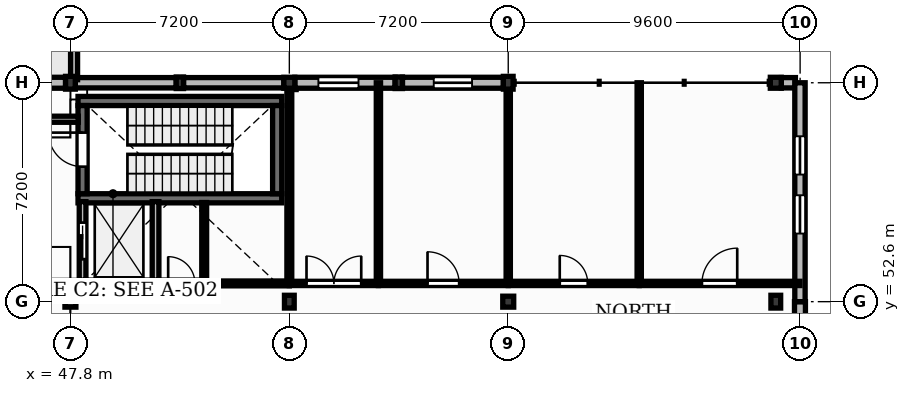
"""IFC4 building model, lengths in metres.
Left out: names, types, materials, properties, quantities, classifications, styles, units other than length and angle.
Written with IfcOpenShell. Run it as: python <this file> out.ifc"""

import sys

from ifc_helpers import new_model, si_unit, direction, frame, frame_2d, origin, origin_2d, place, context, subcontext, project, spatial, rectangle, extrude, element, fill, save


model = new_model("IFC4")
c1 = context("Model", 3, precision=1e-05, world=origin(), true_north=direction((0.0, 1.0)))
c2 = subcontext(c1, "Body", "Model", "MODEL_VIEW")
j1 = project(units=[si_unit("LENGTHUNIT", "METRE"), si_unit("PLANEANGLEUNIT", "RADIAN")], contexts=[c1])
p1 = place(None, origin())
s1 = spatial("IfcSite", under=j1, at=p1, CompositionType="ELEMENT")
p2 = place(p1, origin())
s2 = spatial("IfcBuilding", under=s1, at=p2, CompositionType="ELEMENT")
p3 = place(p2, frame((0.0, 0.0, 4.5)))
s3 = spatial("IfcBuildingStorey", under=s2, at=p3, CompositionType="ELEMENT", Elevation=4.5)
p4 = place(p3, frame((47.8, 52.6, 0.0), z_axis=(0.0, 0.0, 1.0), x_axis=(1.0, 0.0, 0.0)))
e1 = element("IfcColumn", 1, at=p4, inside=s3, PredefinedType="COLUMN", context=c2, shape_type="SweptSolid", body=[
    extrude(rectangle(XDim=0.36, YDim=0.36, at=origin_2d()), origin(), (0.0, 0.0, 1.0), 4.26),
])
for number, where, z_axis, x_axis in (
    (2, (47.8, 59.8, 0.0), (0.0, 0.0, 1.0), (1.0, 0.0, 0.0)),
    (3, (55.0, 52.6, 0.0), (0.0, 0.0, 1.0), (1.0, 0.0, 0.0)),
):
    element("IfcColumn", number, at=place(p3, frame(where, z_axis=z_axis, x_axis=x_axis)), inside=s3, PredefinedType="COLUMN", context=c2, shape_type="SweptSolid", body=[
        extrude(rectangle(XDim=0.32, YDim=0.42, at=origin_2d()), origin(), (0.0, 0.0, 1.0), 4.26),
    ])
for number, where, z_axis, x_axis in (
    (4, (55.0, 59.8, 0.0), (0.0, 0.0, 1.0), (1.0, 0.0, 0.0)),
    (5, (62.2, 52.6, 0.0), (0.0, 0.0, 1.0), (1.0, 0.0, 0.0)),
):
    element("IfcColumn", number, at=place(p3, frame(where, z_axis=z_axis, x_axis=x_axis)), inside=s3, PredefinedType="COLUMN", context=c2, shape_type="SweptSolid", body=[
        extrude(rectangle(XDim=0.36, YDim=0.36, at=origin_2d()), origin(), (0.0, 0.0, 1.0), 4.26),
    ])
for number, where, z_axis, x_axis in (
    (6, (62.2, 59.8, 0.0), (0.0, 0.0, 1.0), (1.0, 0.0, 0.0)),
    (7, (71.0, 52.6, 0.0), (0.0, 0.0, 1.0), (1.0, 0.0, 0.0)),
):
    element("IfcColumn", number, at=place(p3, frame(where, z_axis=z_axis, x_axis=x_axis)), inside=s3, PredefinedType="COLUMN", context=c2, shape_type="SweptSolid", body=[
        extrude(rectangle(XDim=0.32, YDim=0.42, at=origin_2d()), origin(), (0.0, 0.0, 1.0), 4.26),
    ])
p5 = place(p3, frame((71.0, 59.8, 0.0), z_axis=(0.0, 0.0, 1.0), x_axis=(1.0, 0.0, 0.0)))
e8 = element("IfcColumn", 8, at=p5, inside=s3, PredefinedType="COLUMN", context=c2, shape_type="SweptSolid", body=[
    extrude(rectangle(XDim=0.36, YDim=0.36, at=origin_2d()), origin(), (0.0, 0.0, 1.0), 4.26),
])
for number, where, z_axis, x_axis in (
    (9, (51.4, 59.8, 0.0), (0.0, 0.0, 1.0), (1.0, 0.0, 0.0)),
    (10, (58.6, 59.8, 0.0), (0.0, 0.0, 1.0), (1.0, 0.0, 0.0)),
):
    element("IfcColumn", number, at=place(p3, frame(where, z_axis=z_axis, x_axis=x_axis)), inside=s3, PredefinedType="PILASTER", context=c2, shape_type="SweptSolid", body=[
        extrude(rectangle(XDim=0.24, YDim=0.38, at=origin_2d()), origin(), (0.0, 0.0, 1.0), 4.26),
    ])
p6 = place(p3, frame((40.78, 59.8, 0.0), z_axis=(0.0, 0.0, 1.0), x_axis=(1.0, 0.0, 0.0)))
e11 = element("IfcWall", 11, at=p6, inside=s3, PredefinedType="SOLIDWALL", context=c2, shape_type="SweptSolid", body=[
    extrude(rectangle(XDim=6.86, YDim=0.36, at=frame_2d((3.43, 0.0))), origin(), (0.0, 0.0, 1.0), 3.8),
])
p7 = place(p6, frame((0.66, 0.0, 1.05)))
e12 = element("IfcOpeningElement", 12, at=p7, cuts=e11, PredefinedType="OPENING", context=c2, shape_type="SweptSolid", body=[
    extrude(rectangle(XDim=1.82, YDim=1.65, at=frame_2d((0.91, 0.825))), frame((0.0, 0.19, 0.0), z_axis=(0.0, -1.0, 0.0), x_axis=(1.0, 0.0, 0.0)), (0.0, 0.0, 1.0), 0.38),
])
p8 = place(p6, frame((4.33, 0.0, 1.0)))
e13 = element("IfcOpeningElement", 13, at=p8, cuts=e11, PredefinedType="OPENING", context=c2, shape_type="SweptSolid", body=[
    extrude(rectangle(XDim=1.1, YDim=1.8, at=frame_2d((0.55, 0.9))), frame((0.0, 0.19, 0.0), z_axis=(0.0, -1.0, 0.0), x_axis=(1.0, 0.0, 0.0)), (0.0, 0.0, 1.0), 0.38),
])
p9 = place(p3, frame((47.96, 59.8, 0.0), z_axis=(0.0, 0.0, 1.0), x_axis=(1.0, 0.0, 0.0)))
e14 = element("IfcWall", 14, at=p9, inside=s3, PredefinedType="SOLIDWALL", context=c2, shape_type="SweptSolid", body=[
    extrude(rectangle(XDim=3.32, YDim=0.34, at=frame_2d((1.66, 0.0))), origin(), (0.0, 0.0, 1.0), 3.8),
])
p10 = place(p3, frame((51.52, 59.8, 0.0), z_axis=(0.0, 0.0, 1.0), x_axis=(1.0, 0.0, 0.0)))
e15 = element("IfcWall", 15, at=p10, inside=s3, PredefinedType="SOLIDWALL", context=c2, shape_type="SweptSolid", body=[
    extrude(rectangle(XDim=3.3, YDim=0.34, at=frame_2d((1.65, 0.0))), origin(), (0.0, 0.0, 1.0), 3.8),
])
p11 = place(p3, frame((55.18, 59.8, 0.0), z_axis=(0.0, 0.0, 1.0), x_axis=(1.0, 0.0, 0.0)))
e16 = element("IfcWall", 16, at=p11, inside=s3, PredefinedType="SOLIDWALL", context=c2, shape_type="SweptSolid", body=[
    extrude(rectangle(XDim=3.3, YDim=0.36, at=frame_2d((1.65, 0.0))), origin(), (0.0, 0.0, 1.0), 3.8),
])
p12 = place(p11, frame((0.775, 0.0, 1.5)))
e17 = element("IfcOpeningElement", 17, at=p12, cuts=e16, PredefinedType="OPENING", context=c2, shape_type="SweptSolid", body=[
    extrude(rectangle(XDim=1.32, YDim=1.25, at=frame_2d((0.66, 0.625))), frame((0.0, 0.19, 0.0), z_axis=(0.0, -1.0, 0.0), x_axis=(1.0, 0.0, 0.0)), (0.0, 0.0, 1.0), 0.38),
])
p13 = place(p3, frame((58.72, 59.8, 0.0), z_axis=(0.0, 0.0, 1.0), x_axis=(1.0, 0.0, 0.0)))
e18 = element("IfcWall", 18, at=p13, inside=s3, PredefinedType="SOLIDWALL", context=c2, shape_type="SweptSolid", body=[
    extrude(rectangle(XDim=3.32, YDim=0.36, at=frame_2d((1.66, 0.0))), origin(), (0.0, 0.0, 1.0), 3.8),
])
p14 = place(p13, frame((1.03, 0.0, 1.05)))
e19 = element("IfcOpeningElement", 19, at=p14, cuts=e18, PredefinedType="OPENING", context=c2, shape_type="SweptSolid", body=[
    extrude(rectangle(XDim=1.26, YDim=1.65, at=frame_2d((0.63, 0.825))), frame((0.0, 0.19, 0.0), z_axis=(0.0, -1.0, 0.0), x_axis=(1.0, 0.0, 0.0)), (0.0, 0.0, 1.0), 0.38),
])
p15 = place(p3, frame((71.795, 45.4, 0.0), z_axis=(0.0, 0.0, 1.0), x_axis=(0.0, 1.0, 0.0)))
e20 = element("IfcWall", 20, at=p15, inside=s3, PredefinedType="SOLIDWALL", context=c2, shape_type="SweptSolid", body=[
    extrude(rectangle(XDim=7.2, YDim=0.36, at=frame_2d((3.6, 0.0))), origin(), (0.0, 0.0, 1.0), 4.26),
])
p16 = place(p15, frame((0.98, 0.0, 1.0)))
e21 = element("IfcOpeningElement", 21, at=p16, cuts=e20, PredefinedType="OPENING", context=c2, shape_type="SweptSolid", body=[
    extrude(rectangle(XDim=1.34, YDim=1.95, at=frame_2d((0.67, 0.975))), frame((0.0, 0.19, 0.0), z_axis=(0.0, -1.0, 0.0), x_axis=(1.0, 0.0, 0.0)), (0.0, 0.0, 1.0), 0.38),
])
p17 = place(p15, frame((3.0, 0.0, 1.0)))
e22 = element("IfcOpeningElement", 22, at=p17, cuts=e20, PredefinedType="OPENING", context=c2, shape_type="SweptSolid", body=[
    extrude(rectangle(XDim=1.34, YDim=1.95, at=frame_2d((0.67, 0.975))), frame((0.0, 0.19, 0.0), z_axis=(0.0, -1.0, 0.0), x_axis=(1.0, 0.0, 0.0)), (0.0, 0.0, 1.0), 0.38),
])
p18 = place(p3, frame((71.18, 59.8, 0.0), z_axis=(0.0, 0.0, 1.0), x_axis=(1.0, 0.0, 0.0)))
e23 = element("IfcWall", 23, at=p18, inside=s3, PredefinedType="SOLIDWALL", context=c2, shape_type="SweptSolid", body=[
    extrude(rectangle(XDim=0.465, YDim=0.34, at=frame_2d((0.232, 0.0))), origin(), (0.0, 0.0, 1.0), 4.26),
])
p19 = place(p3, frame((71.795, 52.6, 0.0), z_axis=(0.0, 0.0, 1.0), x_axis=(0.0, 1.0, 0.0)))
e24 = element("IfcWall", 24, at=p19, inside=s3, PredefinedType="SOLIDWALL", context=c2, shape_type="SweptSolid", body=[
    extrude(rectangle(XDim=7.2, YDim=0.34, at=frame_2d((3.6, 0.0))), origin(), (0.0, 0.0, 1.0), 4.26),
])
p20 = place(p19, frame((2.24, 0.0, 1.05)))
e25 = element("IfcOpeningElement", 25, at=p20, cuts=e24, PredefinedType="OPENING", context=c2, shape_type="SweptSolid", body=[
    extrude(rectangle(XDim=1.26, YDim=1.65, at=frame_2d((0.63, 0.825))), frame((0.0, 0.18, 0.0), z_axis=(0.0, -1.0, 0.0), x_axis=(1.0, 0.0, 0.0)), (0.0, 0.0, 1.0), 0.36),
])
p21 = place(p19, frame((4.18, 0.0, 1.05)))
e26 = element("IfcOpeningElement", 26, at=p21, cuts=e24, PredefinedType="OPENING", context=c2, shape_type="SweptSolid", body=[
    extrude(rectangle(XDim=1.26, YDim=1.65, at=frame_2d((0.63, 0.825))), frame((0.0, 0.18, 0.0), z_axis=(0.0, -1.0, 0.0), x_axis=(1.0, 0.0, 0.0)), (0.0, 0.0, 1.0), 0.36),
])
p22 = place(p3, frame((47.92, 59.9, -0.05), z_axis=(0.0, 0.0, 1.0), x_axis=(0.0, 1.0, 0.0)))
e27 = element("IfcWall", 27, at=p22, inside=s3, PredefinedType="PARAPET", context=c2, shape_type="SweptSolid", body=[
    extrude(rectangle(XDim=1.68, YDim=0.23, at=frame_2d((0.84, 0.0))), origin(), (0.0, 0.0, 1.0), 0.8),
])
for number, where, z_axis, x_axis in (
    (28, (48.05, 56.0, 0.0), (0.0, 0.0, 1.0), (1.0, 0.0, 0.0)),
    (29, (48.05, 59.2, 0.0), (0.0, 0.0, 1.0), (1.0, 0.0, 0.0)),
):
    element("IfcWall", number, at=place(p3, frame(where, z_axis=z_axis, x_axis=x_axis)), inside=s3, PredefinedType="SHEAR", context=c2, shape_type="SweptSolid", body=[
        extrude(rectangle(XDim=6.7, YDim=0.3, at=frame_2d((3.35, 0.0))), origin(), (0.0, 0.0, 1.0), 4.25),
    ])
p23 = place(p3, frame((48.2, 56.15, 0.0), z_axis=(0.0, 0.0, 1.0), x_axis=(0.0, 1.0, 0.0)))
e30 = element("IfcWall", 30, at=p23, inside=s3, PredefinedType="SHEAR", context=c2, shape_type="SweptSolid", body=[
    extrude(rectangle(XDim=2.9, YDim=0.3, at=frame_2d((1.45, 0.0))), origin(), (0.0, 0.0, 1.0), 4.25),
])
p24 = place(p23, frame((0.89, 0.0, 0.0)))
e31 = element("IfcOpeningElement", 31, at=p24, cuts=e30, PredefinedType="OPENING", context=c2, shape_type="SweptSolid", body=[
    extrude(rectangle(XDim=1.12, YDim=2.1, at=frame_2d((0.56, 1.05))), frame((0.0, 0.16, 0.0), z_axis=(0.0, -1.0, 0.0), x_axis=(1.0, 0.0, 0.0)), (0.0, 0.0, 1.0), 0.32),
])
p25 = place(p3, frame((54.6, 56.15, 0.0), z_axis=(0.0, 0.0, 1.0), x_axis=(0.0, 1.0, 0.0)))
e32 = element("IfcWall", 32, at=p25, inside=s3, PredefinedType="SHEAR", context=c2, shape_type="SweptSolid", body=[
    extrude(rectangle(XDim=2.9, YDim=0.3, at=frame_2d((1.45, 0.0))), origin(), (0.0, 0.0, 1.0), 4.25),
])
p26 = place(p3, frame((48.2, 53.2, 0.0), z_axis=(0.0, 0.0, 1.0), x_axis=(1.0, 0.0, 0.0)))
e33 = element("IfcWall", 33, at=p26, inside=s3, PredefinedType="SOLIDWALL", context=c2, shape_type="SweptSolid", body=[
    extrude(rectangle(XDim=2.4, YDim=0.22, at=frame_2d((1.2, 0.0))), origin(), (0.0, 0.0, 1.0), 4.25),
])
p27 = place(p3, frame((48.2, 53.31, 0.0), z_axis=(0.0, 0.0, 1.0), x_axis=(0.0, 1.0, 0.0)))
e34 = element("IfcWall", 34, at=p27, inside=s3, PredefinedType="SOLIDWALL", context=c2, shape_type="SweptSolid", body=[
    extrude(rectangle(XDim=2.58, YDim=0.22, at=frame_2d((1.29, 0.0))), origin(), (0.0, 0.0, 1.0), 4.25),
])
p28 = place(p27, frame((0.69, 0.0, 0.0)))
e35 = element("IfcOpeningElement", 35, at=p28, cuts=e34, PredefinedType="OPENING", context=c2, shape_type="SweptSolid", body=[
    extrude(rectangle(XDim=1.2, YDim=2.15, at=frame_2d((0.6, 1.075))), frame((0.0, 0.12, 0.0), z_axis=(0.0, -1.0, 0.0), x_axis=(1.0, 0.0, 0.0)), (0.0, 0.0, 1.0), 0.24),
])
p29 = place(p3, frame((50.6, 53.31, 0.0), z_axis=(0.0, 0.0, 1.0), x_axis=(0.0, 1.0, 0.0)))
e36 = element("IfcWall", 36, at=p29, inside=s3, PredefinedType="SOLIDWALL", context=c2, shape_type="SweptSolid", body=[
    extrude(rectangle(XDim=2.58, YDim=0.22, at=frame_2d((1.29, 0.0))), origin(), (0.0, 0.0, 1.0), 4.25),
])
p30 = place(p3, frame((43.8, 53.2, 0.0), z_axis=(0.0, 0.0, 1.0), x_axis=(1.0, 0.0, 0.0)))
e37 = element("IfcWall", 37, at=p30, inside=s3, PredefinedType="PARTITIONING", context=c2, shape_type="SweptSolid", body=[
    extrude(rectangle(XDim=4.29, YDim=0.2, at=frame_2d((2.145, 0.0))), origin(), (0.0, 0.0, 1.0), 4.18),
])
p31 = place(p30, frame((1.405, 0.0, 0.0)))
e38 = element("IfcOpeningElement", 38, at=p31, cuts=e37, PredefinedType="OPENING", context=c2, shape_type="SweptSolid", body=[
    extrude(rectangle(XDim=1.48, YDim=2.25, at=frame_2d((0.74, 1.125))), frame((0.0, 0.11, 0.0), z_axis=(0.0, -1.0, 0.0), x_axis=(1.0, 0.0, 0.0)), (0.0, 0.0, 1.0), 0.22),
])
p32 = place(p3, frame((50.71, 53.2, 0.0), z_axis=(0.0, 0.0, 1.0), x_axis=(1.0, 0.0, 0.0)))
e39 = element("IfcWall", 39, at=p32, inside=s3, PredefinedType="SOLIDWALL", context=c2, shape_type="SweptSolid", body=[
    extrude(rectangle(XDim=1.49, YDim=0.22, at=frame_2d((0.745, 0.0))), origin(), (0.0, 0.0, 1.0), 4.18),
])
p33 = place(p32, frame((0.305, 0.0, 0.0)))
e40 = element("IfcOpeningElement", 40, at=p33, cuts=e39, PredefinedType="OPENING", context=c2, shape_type="SweptSolid", body=[
    extrude(rectangle(XDim=0.88, YDim=2.05, at=frame_2d((0.44, 1.025))), frame((0.0, 0.12, 0.0), z_axis=(0.0, -1.0, 0.0), x_axis=(1.0, 0.0, 0.0)), (0.0, 0.0, 1.0), 0.24),
])
p34 = place(p3, frame((55.0, 53.2, 0.0), z_axis=(0.0, 0.0, 1.0), x_axis=(1.0, 0.0, 0.0)))
e41 = element("IfcWall", 41, at=p34, inside=s3, PredefinedType="PARTITIONING", context=c2, shape_type="SweptSolid", body=[
    extrude(rectangle(XDim=2.93, YDim=0.14, at=frame_2d((1.465, 0.0))), origin(), (0.0, 0.0, 1.0), 4.18),
])
p35 = place(p34, frame((0.565, 0.0, 0.0)))
e42 = element("IfcOpeningElement", 42, at=p35, cuts=e41, PredefinedType="OPENING", context=c2, shape_type="SweptSolid", body=[
    extrude(rectangle(XDim=1.8, YDim=2.3, at=frame_2d((0.9, 1.15))), frame((0.0, 0.08, 0.0), z_axis=(0.0, -1.0, 0.0), x_axis=(1.0, 0.0, 0.0)), (0.0, 0.0, 1.0), 0.16),
])
p36 = place(p3, frame((57.93, 53.27, 0.0), z_axis=(0.0, 0.0, 1.0), x_axis=(0.0, 1.0, 0.0)))
e43 = element("IfcWall", 43, at=p36, inside=s3, PredefinedType="PARTITIONING", context=c2, shape_type="SweptSolid", body=[
    extrude(rectangle(XDim=6.53, YDim=0.14, at=frame_2d((3.265, 0.0))), origin(), (0.0, 0.0, 1.0), 4.18),
])
p37 = place(p3, frame((57.93, 53.2, 0.0), z_axis=(0.0, 0.0, 1.0), x_axis=(1.0, 0.0, 0.0)))
e44 = element("IfcWall", 44, at=p37, inside=s3, PredefinedType="PARTITIONING", context=c2, shape_type="SweptSolid", body=[
    extrude(rectangle(XDim=4.27, YDim=0.14, at=frame_2d((2.135, 0.0))), origin(), (0.0, 0.0, 1.0), 4.18),
])
p38 = place(p37, frame((1.615, 0.0, 0.0)))
e45 = element("IfcOpeningElement", 45, at=p38, cuts=e44, PredefinedType="OPENING", context=c2, shape_type="SweptSolid", body=[
    extrude(rectangle(XDim=1.04, YDim=2.1, at=frame_2d((0.52, 1.05))), frame((0.0, 0.08, 0.0), z_axis=(0.0, -1.0, 0.0), x_axis=(1.0, 0.0, 0.0)), (0.0, 0.0, 1.0), 0.16),
])
p39 = place(p3, frame((62.2, 53.27, 0.0), z_axis=(0.0, 0.0, 1.0), x_axis=(0.0, 1.0, 0.0)))
e46 = element("IfcWall", 46, at=p39, inside=s3, PredefinedType="PARTITIONING", context=c2, shape_type="SweptSolid", body=[
    extrude(rectangle(XDim=6.32, YDim=0.14, at=frame_2d((3.16, 0.0))), origin(), (0.0, 0.0, 1.0), 3.74),
])
p40 = place(p3, frame((62.2, 53.2, 0.0), z_axis=(0.0, 0.0, 1.0), x_axis=(1.0, 0.0, 0.0)))
e47 = element("IfcWall", 47, at=p40, inside=s3, PredefinedType="PARTITIONING", context=c2, shape_type="SweptSolid", body=[
    extrude(rectangle(XDim=4.308, YDim=0.14, at=frame_2d((2.154, 0.0))), origin(), (0.0, 0.0, 1.0), 4.18),
])
p41 = place(p40, frame((1.694, 0.0, 0.0)))
e48 = element("IfcOpeningElement", 48, at=p41, cuts=e47, PredefinedType="OPENING", context=c2, shape_type="SweptSolid", body=[
    extrude(rectangle(XDim=0.92, YDim=2.1, at=frame_2d((0.46, 1.05))), frame((0.0, 0.08, 0.0), z_axis=(0.0, -1.0, 0.0), x_axis=(1.0, 0.0, 0.0)), (0.0, 0.0, 1.0), 0.16),
])
p42 = place(p3, frame((66.508, 53.27, 0.0), z_axis=(0.0, 0.0, 1.0), x_axis=(0.0, 1.0, 0.0)))
e49 = element("IfcWall", 49, at=p42, inside=s3, PredefinedType="PARTITIONING", context=c2, shape_type="SweptSolid", body=[
    extrude(rectangle(XDim=6.53, YDim=0.14, at=frame_2d((3.265, 0.0))), origin(), (0.0, 0.0, 1.0), 3.86),
])
p43 = place(p3, frame((66.508, 53.2, 0.0), z_axis=(0.0, 0.0, 1.0), x_axis=(1.0, 0.0, 0.0)))
e50 = element("IfcWall", 50, at=p43, inside=s3, PredefinedType="PARTITIONING", context=c2, shape_type="SweptSolid", body=[
    extrude(rectangle(XDim=5.287, YDim=0.14, at=frame_2d((2.644, 0.0))), origin(), (0.0, 0.0, 1.0), 4.18),
])
p44 = place(p43, frame((2.063, 0.0, 0.0)))
e51 = element("IfcOpeningElement", 51, at=p44, cuts=e50, PredefinedType="OPENING", context=c2, shape_type="SweptSolid", body=[
    extrude(rectangle(XDim=1.16, YDim=2.1, at=frame_2d((0.58, 1.05))), frame((0.0, 0.08, 0.0), z_axis=(0.0, -1.0, 0.0), x_axis=(1.0, 0.0, 0.0)), (0.0, 0.0, 1.0), 0.16),
])
p45 = place(p3, frame((52.2, 53.27, 0.0), z_axis=(0.0, 0.0, 1.0), x_axis=(0.0, 1.0, 0.0)))
e52 = element("IfcWall", 52, at=p45, inside=s3, PredefinedType="PARTITIONING", context=c2, shape_type="SweptSolid", body=[
    extrude(rectangle(XDim=2.59, YDim=0.16, at=frame_2d((1.295, 0.0))), origin(), (0.0, 0.0, 1.0), 4.18),
])
p46 = place(p3, frame((48.06, 58.6, 0.0), z_axis=(0.0, 0.0, 1.0), x_axis=(-1.0, 0.0, 0.0)))
e53 = element("IfcWall", 53, at=p46, inside=s3, PredefinedType="PARTITIONING", context=c2, shape_type="SweptSolid", body=[
    extrude(rectangle(XDim=4.26, YDim=0.2, at=frame_2d((2.13, 0.0))), origin(), (0.0, 0.0, 1.0), 4.18),
])
p47 = place(p3, frame((55.0, 53.2, 0.0), z_axis=(0.0, 0.0, 1.0), x_axis=(-1.0, 0.0, 0.0)))
e54 = element("IfcWall", 54, at=p47, inside=s3, PredefinedType="PARTITIONING", context=c2, shape_type="SweptSolid", body=[
    extrude(rectangle(XDim=2.8, YDim=0.16, at=frame_2d((1.4, 0.0))), origin(), (0.0, 0.0, 1.0), 4.18),
])
p48 = place(p3, frame((55.0, 53.27, 0.0), z_axis=(0.0, 0.0, 1.0), x_axis=(0.0, 1.0, 0.0)))
e55 = element("IfcWall", 55, at=p48, inside=s3, PredefinedType="PARTITIONING", context=c2, shape_type="SweptSolid", body=[
    extrude(rectangle(XDim=6.35, YDim=0.16, at=frame_2d((3.175, 0.0))), origin(), (0.0, 0.0, 1.0), 3.74),
])
p49 = place(p12, origin())
e56 = element("IfcWindow", 56, at=p49, inside=s3, PartitioningType="SINGLE_PANEL", PredefinedType="WINDOW", context=c2, shape_type="SweptSolid", body=[
    extrude(rectangle(XDim=1.32, YDim=1.25, at=frame_2d((0.66, 0.625))), frame((0.0, 0.03, 0.0), z_axis=(0.0, -1.0, 0.0), x_axis=(1.0, 0.0, 0.0)), (0.0, 0.0, 1.0), 0.06),
])
fill(e17, e56)
p50 = place(p14, origin())
e57 = element("IfcWindow", 57, at=p50, inside=s3, PartitioningType="SINGLE_PANEL", PredefinedType="WINDOW", context=c2, shape_type="SweptSolid", body=[
    extrude(rectangle(XDim=1.26, YDim=1.65, at=frame_2d((0.63, 0.825))), frame((0.0, 0.03, 0.0), z_axis=(0.0, -1.0, 0.0), x_axis=(1.0, 0.0, 0.0)), (0.0, 0.0, 1.0), 0.06),
])
fill(e19, e57)
p51 = place(p20, origin())
e58 = element("IfcWindow", 58, at=p51, inside=s3, PartitioningType="SINGLE_PANEL", PredefinedType="WINDOW", context=c2, shape_type="SweptSolid", body=[
    extrude(rectangle(XDim=1.26, YDim=1.65, at=frame_2d((0.63, 0.825))), frame((0.0, 0.03, 0.0), z_axis=(0.0, -1.0, 0.0), x_axis=(1.0, 0.0, 0.0)), (0.0, 0.0, 1.0), 0.06),
])
fill(e25, e58)
p52 = place(p21, origin())
e59 = element("IfcWindow", 59, at=p52, inside=s3, PartitioningType="SINGLE_PANEL", PredefinedType="WINDOW", context=c2, shape_type="SweptSolid", body=[
    extrude(rectangle(XDim=1.26, YDim=1.65, at=frame_2d((0.63, 0.825))), frame((0.0, 0.03, 0.0), z_axis=(0.0, -1.0, 0.0), x_axis=(1.0, 0.0, 0.0)), (0.0, 0.0, 1.0), 0.06),
])
fill(e26, e59)
p53 = place(p28, origin())
e60 = element("IfcDoor", 60, at=p53, inside=s3, OperationType="SLIDING_TO_LEFT", PredefinedType="DOOR", context=c2, shape_type="SweptSolid", body=[
    extrude(rectangle(XDim=1.2, YDim=2.15, at=frame_2d((0.6, 1.075))), frame((0.0, 0.025, 0.0), z_axis=(0.0, -1.0, 0.0), x_axis=(1.0, 0.0, 0.0)), (0.0, 0.0, 1.0), 0.05),
])
fill(e35, e60)
p54 = place(p24, origin())
e61 = element("IfcDoor", 61, at=p54, inside=s3, OperationType="SINGLE_SWING_RIGHT", PredefinedType="DOOR", context=c2, shape_type="SweptSolid", body=[
    extrude(rectangle(XDim=1.12, YDim=2.1, at=frame_2d((0.56, 1.05))), frame((0.0, 0.025, 0.0), z_axis=(0.0, -1.0, 0.0), x_axis=(1.0, 0.0, 0.0)), (0.0, 0.0, 1.0), 0.05),
])
fill(e31, e61)
p55 = place(p33, origin())
e62 = element("IfcDoor", 62, at=p55, inside=s3, OperationType="SINGLE_SWING_LEFT", PredefinedType="DOOR", context=c2, shape_type="SweptSolid", body=[
    extrude(rectangle(XDim=0.88, YDim=2.05, at=frame_2d((0.44, 1.025))), frame((0.0, 0.025, 0.0), z_axis=(0.0, -1.0, 0.0), x_axis=(1.0, 0.0, 0.0)), (0.0, 0.0, 1.0), 0.05),
])
fill(e40, e62)
p56 = place(p35, origin())
e63 = element("IfcDoor", 63, at=p56, inside=s3, OperationType="DOUBLE_DOOR_SINGLE_SWING", PredefinedType="DOOR", context=c2, shape_type="SweptSolid", body=[
    extrude(rectangle(XDim=1.8, YDim=2.3, at=frame_2d((0.9, 1.15))), frame((0.0, 0.025, 0.0), z_axis=(0.0, -1.0, 0.0), x_axis=(1.0, 0.0, 0.0)), (0.0, 0.0, 1.0), 0.05),
])
fill(e42, e63)
p57 = place(p38, origin())
e64 = element("IfcDoor", 64, at=p57, inside=s3, OperationType="SINGLE_SWING_LEFT", PredefinedType="DOOR", context=c2, shape_type="SweptSolid", body=[
    extrude(rectangle(XDim=1.04, YDim=2.1, at=frame_2d((0.52, 1.05))), frame((0.0, 0.025, 0.0), z_axis=(0.0, -1.0, 0.0), x_axis=(1.0, 0.0, 0.0)), (0.0, 0.0, 1.0), 0.05),
])
fill(e45, e64)
p58 = place(p41, origin())
e65 = element("IfcDoor", 65, at=p58, inside=s3, OperationType="SINGLE_SWING_LEFT", PredefinedType="DOOR", context=c2, shape_type="SweptSolid", body=[
    extrude(rectangle(XDim=0.92, YDim=2.1, at=frame_2d((0.46, 1.05))), frame((0.0, 0.025, 0.0), z_axis=(0.0, -1.0, 0.0), x_axis=(1.0, 0.0, 0.0)), (0.0, 0.0, 1.0), 0.05),
])
fill(e48, e65)
p59 = place(p44, origin())
e66 = element("IfcDoor", 66, at=p59, inside=s3, OperationType="SINGLE_SWING_RIGHT", PredefinedType="DOOR", context=c2, shape_type="SweptSolid", body=[
    extrude(rectangle(XDim=1.16, YDim=2.1, at=frame_2d((0.58, 1.05))), frame((0.0, 0.025, 0.0), z_axis=(0.0, -1.0, 0.0), x_axis=(1.0, 0.0, 0.0)), (0.0, 0.0, 1.0), 0.05),
])
fill(e51, e66)
save(model, sys.argv[1])
